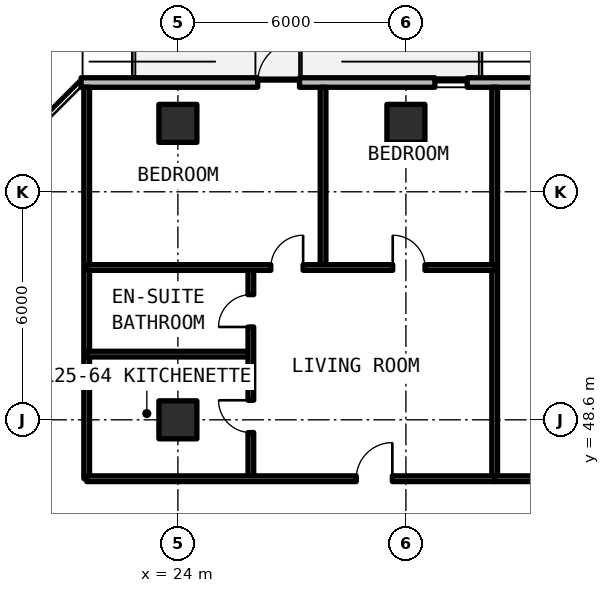
"""IFC4 building model, lengths in metres.
Left out: names, types, materials, properties, quantities, classifications, styles, units other than length and angle.
Written with IfcOpenShell. Run it as: python <this file> out.ifc"""

import sys

from ifc_helpers import new_model, si_unit, direction, frame, frame_2d, origin, origin_2d, place, context, subcontext, project, spatial, rectangle, extrude, element, fill, save


model = new_model("IFC4")
c1 = context("Model", 3, precision=1e-05, world=origin(), true_north=direction((0.0, 1.0)))
c2 = subcontext(c1, "Body", "Model", "MODEL_VIEW")
j1 = project(units=[si_unit("LENGTHUNIT", "METRE"), si_unit("PLANEANGLEUNIT", "RADIAN")], contexts=[c1])
p1 = place(None, origin())
s1 = spatial("IfcSite", under=j1, at=p1, CompositionType="ELEMENT")
p2 = place(p1, origin())
s2 = spatial("IfcBuilding", under=s1, at=p2, CompositionType="ELEMENT")
p3 = place(p2, frame((0.0, 0.0, 92.07)))
s3 = spatial("IfcBuildingStorey", under=s2, at=p3, CompositionType="ELEMENT", Elevation=92.07)
for number, where, z_axis, x_axis in (
    (1, (24.0, 48.6, 0.0), (0.0, 0.0, 1.0), (1.0, 0.0, 0.0)),
    (2, (24.0, 56.4, 0.0), (0.0, 0.0, 1.0), (1.0, 0.0, 0.0)),
    (3, (30.0, 56.4, 0.0), (0.0, 0.0, 1.0), (1.0, 0.0, 0.0)),
):
    element("IfcColumn", number, at=place(p3, frame(where, z_axis=z_axis, x_axis=x_axis)), inside=s3, PredefinedType="COLUMN", context=c2, shape_type="SweptSolid", body=[
        extrude(rectangle(XDim=1.0, YDim=1.0, at=origin_2d()), origin(), (0.0, 0.0, 1.0), 3.3),
    ])
p4 = place(p3, frame((43.475, 57.475, 0.0), z_axis=(0.0, 0.0, 1.0), x_axis=(-1.0, 0.0, 0.0)))
e4 = element("IfcWall", 4, at=p4, inside=s3, PredefinedType="SOLIDWALL", context=c2, shape_type="SweptSolid", body=[
    extrude(rectangle(XDim=22.023, YDim=0.25, at=frame_2d((11.012, 0.0))), origin(), (0.0, 0.0, 1.0), 3.08),
])
p5 = place(p4, frame((16.275, 0.0, 0.0)))
e5 = element("IfcOpeningElement", 5, at=p5, cuts=e4, PredefinedType="OPENING", context=c2, shape_type="SweptSolid", body=[
    extrude(rectangle(XDim=1.1, YDim=2.15, at=frame_2d((0.55, 1.075))), frame((0.0, 0.135, 0.0), z_axis=(0.0, -1.0, 0.0), x_axis=(1.0, 0.0, 0.0)), (0.0, 0.0, 1.0), 0.27),
])
p6 = place(p4, frame((11.862, 0.0, 0.78)))
e6 = element("IfcOpeningElement", 6, at=p6, cuts=e4, PredefinedType="OPENING", context=c2, shape_type="SweptSolid", body=[
    extrude(rectangle(XDim=0.85, YDim=1.65, at=frame_2d((0.425, 0.825))), frame((0.0, 0.135, 0.0), z_axis=(0.0, -1.0, 0.0), x_axis=(1.0, 0.0, 0.0)), (0.0, 0.0, 1.0), 0.27),
])
p7 = place(p4, frame((4.567, 0.0, 0.78)))
e7 = element("IfcOpeningElement", 7, at=p7, cuts=e4, PredefinedType="OPENING", context=c2, shape_type="SweptSolid", body=[
    extrude(rectangle(XDim=2.0, YDim=1.66, at=frame_2d((1.0, 0.83))), frame((0.0, 0.135, 0.0), z_axis=(0.0, -1.0, 0.0), x_axis=(1.0, 0.0, 0.0)), (0.0, 0.0, 1.0), 0.27),
])
for number, where, z_axis, x_axis in (
    (8, (21.6, 47.05, 0.0), (0.0, 0.0, 1.0), (0.0, 1.0, 0.0)),
    (9, (32.336, 47.05, 0.0), (0.0, 0.0, 1.0), (0.0, 1.0, 0.0)),
):
    element("IfcWall", number, at=place(p3, frame(where, z_axis=z_axis, x_axis=x_axis)), inside=s3, PredefinedType="SOLIDWALL", context=c2, shape_type="SweptSolid", body=[
        extrude(rectangle(XDim=10.3, YDim=0.15, at=frame_2d((5.15, 0.0))), origin(), (0.0, 0.0, 1.0), 2.35),
    ])
p8 = place(p3, frame((21.6, 50.329, 0.0), z_axis=(0.0, 0.0, 1.0), x_axis=(1.0, 0.0, 0.0)))
e10 = element("IfcWall", 10, at=p8, inside=s3, PredefinedType="PARTITIONING", context=c2, shape_type="SweptSolid", body=[
    extrude(rectangle(XDim=4.32, YDim=0.15, at=frame_2d((2.16, 0.0))), origin(), (0.0, 0.0, 1.0), 2.35),
])
p9 = place(p3, frame((25.92, 47.05, 0.0), z_axis=(0.0, 0.0, 1.0), x_axis=(0.0, 1.0, 0.0)))
e11 = element("IfcWall", 11, at=p9, inside=s3, PredefinedType="PARTITIONING", context=c2, shape_type="SweptSolid", body=[
    extrude(rectangle(XDim=5.557, YDim=0.15, at=frame_2d((2.779, 0.0))), origin(), (0.0, 0.0, 1.0), 2.35),
])
p10 = place(p9, frame((1.214, 0.0, 0.0)))
e12 = element("IfcOpeningElement", 12, at=p10, cuts=e11, PredefinedType="OPENING", context=c2, shape_type="SweptSolid", body=[
    extrude(rectangle(XDim=0.85, YDim=2.1, at=frame_2d((0.425, 1.05))), frame((0.0, 0.085, 0.0), z_axis=(0.0, -1.0, 0.0), x_axis=(1.0, 0.0, 0.0)), (0.0, 0.0, 1.0), 0.17),
])
p11 = place(p9, frame((3.993, 0.0, 0.0)))
e13 = element("IfcOpeningElement", 13, at=p11, cuts=e11, PredefinedType="OPENING", context=c2, shape_type="SweptSolid", body=[
    extrude(rectangle(XDim=0.85, YDim=2.1, at=frame_2d((0.425, 1.05))), frame((0.0, 0.085, 0.0), z_axis=(0.0, -1.0, 0.0), x_axis=(1.0, 0.0, 0.0)), (0.0, 0.0, 1.0), 0.17),
])
p12 = place(p3, frame((27.82, 52.607, 0.0), z_axis=(0.0, 0.0, 1.0), x_axis=(0.0, 1.0, 0.0)))
e14 = element("IfcWall", 14, at=p12, inside=s3, PredefinedType="PARTITIONING", context=c2, shape_type="SweptSolid", body=[
    extrude(rectangle(XDim=4.743, YDim=0.15, at=frame_2d((2.372, 0.0))), origin(), (0.0, 0.0, 1.0), 2.35),
])
p13 = place(p3, frame((21.6, 52.607, 0.0), z_axis=(0.0, 0.0, 1.0), x_axis=(1.0, 0.0, 0.0)))
e15 = element("IfcWall", 15, at=p13, inside=s3, PredefinedType="PARTITIONING", context=c2, shape_type="SweptSolid", body=[
    extrude(rectangle(XDim=10.736, YDim=0.15, at=frame_2d((5.368, 0.0))), origin(), (0.0, 0.0, 1.0), 2.35),
])
p14 = place(p13, frame((4.845, 0.0, 0.0)))
e16 = element("IfcOpeningElement", 16, at=p14, cuts=e15, PredefinedType="OPENING", context=c2, shape_type="SweptSolid", body=[
    extrude(rectangle(XDim=0.85, YDim=2.1, at=frame_2d((0.425, 1.05))), frame((0.0, 0.085, 0.0), z_axis=(0.0, -1.0, 0.0), x_axis=(1.0, 0.0, 0.0)), (0.0, 0.0, 1.0), 0.17),
])
p15 = place(p13, frame((8.053, 0.0, 0.0)))
e17 = element("IfcOpeningElement", 17, at=p15, cuts=e15, PredefinedType="OPENING", context=c2, shape_type="SweptSolid", body=[
    extrude(rectangle(XDim=0.85, YDim=2.1, at=frame_2d((0.425, 1.05))), frame((0.0, 0.085, 0.0), z_axis=(0.0, -1.0, 0.0), x_axis=(1.0, 0.0, 0.0)), (0.0, 0.0, 1.0), 0.17),
])
p16 = place(p3, frame((21.6, 47.05, 0.0), z_axis=(0.0, 0.0, 1.0), x_axis=(1.0, 0.0, 0.0)))
e18 = element("IfcWall", 18, at=p16, inside=s3, PredefinedType="SOLIDWALL", context=c2, shape_type="SweptSolid", body=[
    extrude(rectangle(XDim=10.736, YDim=0.15, at=frame_2d((5.368, 0.0))), origin(), (0.0, 0.0, 1.0), 2.35),
])
p17 = place(p16, frame((7.093, 0.0, 0.0)))
e19 = element("IfcOpeningElement", 19, at=p17, cuts=e18, PredefinedType="OPENING", context=c2, shape_type="SweptSolid", body=[
    extrude(rectangle(XDim=0.95, YDim=2.15, at=frame_2d((0.475, 1.075))), frame((0.0, 0.085, 0.0), z_axis=(0.0, -1.0, 0.0), x_axis=(1.0, 0.0, 0.0)), (0.0, 0.0, 1.0), 0.17),
])
p18 = place(p3, frame((32.336, 47.05, 0.0), z_axis=(0.0, 0.0, 1.0), x_axis=(1.0, 0.0, 0.0)))
e20 = element("IfcWall", 20, at=p18, inside=s3, PredefinedType="SOLIDWALL", context=c2, shape_type="SweptSolid", body=[
    extrude(rectangle(XDim=11.144, YDim=0.15, at=frame_2d((5.572, 0.0))), origin(), (0.0, 0.0, 1.0), 2.35),
])
p19 = place(p18, frame((5.022, 0.0, 0.0)))
e21 = element("IfcOpeningElement", 21, at=p19, cuts=e20, PredefinedType="OPENING", context=c2, shape_type="SweptSolid", body=[
    extrude(rectangle(XDim=1.1, YDim=2.15, at=frame_2d((0.55, 1.075))), frame((0.0, 0.085, 0.0), z_axis=(0.0, -1.0, 0.0), x_axis=(1.0, 0.0, 0.0)), (0.0, 0.0, 1.0), 0.17),
])
p20 = place(p5, frame((1.1, 0.0, 0.0), z_axis=(0.0, 0.0, 1.0), x_axis=(-1.0, 0.0, 0.0)))
e22 = element("IfcDoor", 22, at=p20, inside=s3, OperationType="SINGLE_SWING_LEFT", PredefinedType="DOOR", context=c2, shape_type="SweptSolid", body=[
    extrude(rectangle(XDim=1.1, YDim=2.15, at=frame_2d((0.55, 1.075))), frame((0.0, 0.025, 0.0), z_axis=(0.0, -1.0, 0.0), x_axis=(1.0, 0.0, 0.0)), (0.0, 0.0, 1.0), 0.05),
])
fill(e5, e22)
p21 = place(p6, origin())
e23 = element("IfcWindow", 23, at=p21, inside=s3, PartitioningType="SINGLE_PANEL", PredefinedType="WINDOW", context=c2, shape_type="SweptSolid", body=[
    extrude(rectangle(XDim=0.85, YDim=1.65, at=frame_2d((0.425, 0.825))), frame((0.0, 0.03, 0.0), z_axis=(0.0, -1.0, 0.0), x_axis=(1.0, 0.0, 0.0)), (0.0, 0.0, 1.0), 0.06),
])
fill(e6, e23)
p22 = place(p10, origin())
e24 = element("IfcDoor", 24, at=p22, inside=s3, OperationType="SINGLE_SWING_RIGHT", PredefinedType="DOOR", context=c2, shape_type="SweptSolid", body=[
    extrude(rectangle(XDim=0.85, YDim=2.1, at=frame_2d((0.425, 1.05))), frame((0.0, 0.025, 0.0), z_axis=(0.0, -1.0, 0.0), x_axis=(1.0, 0.0, 0.0)), (0.0, 0.0, 1.0), 0.05),
])
fill(e12, e24)
p23 = place(p11, origin())
e25 = element("IfcDoor", 25, at=p23, inside=s3, OperationType="SINGLE_SWING_LEFT", PredefinedType="DOOR", context=c2, shape_type="SweptSolid", body=[
    extrude(rectangle(XDim=0.85, YDim=2.1, at=frame_2d((0.425, 1.05))), frame((0.0, 0.025, 0.0), z_axis=(0.0, -1.0, 0.0), x_axis=(1.0, 0.0, 0.0)), (0.0, 0.0, 1.0), 0.05),
])
fill(e13, e25)
p24 = place(p14, origin())
e26 = element("IfcDoor", 26, at=p24, inside=s3, OperationType="SINGLE_SWING_RIGHT", PredefinedType="DOOR", context=c2, shape_type="SweptSolid", body=[
    extrude(rectangle(XDim=0.85, YDim=2.1, at=frame_2d((0.425, 1.05))), frame((0.0, 0.025, 0.0), z_axis=(0.0, -1.0, 0.0), x_axis=(1.0, 0.0, 0.0)), (0.0, 0.0, 1.0), 0.05),
])
fill(e16, e26)
p25 = place(p15, origin())
e27 = element("IfcDoor", 27, at=p25, inside=s3, OperationType="SINGLE_SWING_LEFT", PredefinedType="DOOR", context=c2, shape_type="SweptSolid", body=[
    extrude(rectangle(XDim=0.85, YDim=2.1, at=frame_2d((0.425, 1.05))), frame((0.0, 0.025, 0.0), z_axis=(0.0, -1.0, 0.0), x_axis=(1.0, 0.0, 0.0)), (0.0, 0.0, 1.0), 0.05),
])
fill(e17, e27)
p26 = place(p17, origin())
e28 = element("IfcDoor", 28, at=p26, inside=s3, OperationType="SINGLE_SWING_RIGHT", PredefinedType="DOOR", context=c2, shape_type="SweptSolid", body=[
    extrude(rectangle(XDim=0.95, YDim=2.15, at=frame_2d((0.475, 1.075))), frame((0.0, 0.025, 0.0), z_axis=(0.0, -1.0, 0.0), x_axis=(1.0, 0.0, 0.0)), (0.0, 0.0, 1.0), 0.05),
])
fill(e19, e28)
save(model, sys.argv[1])
